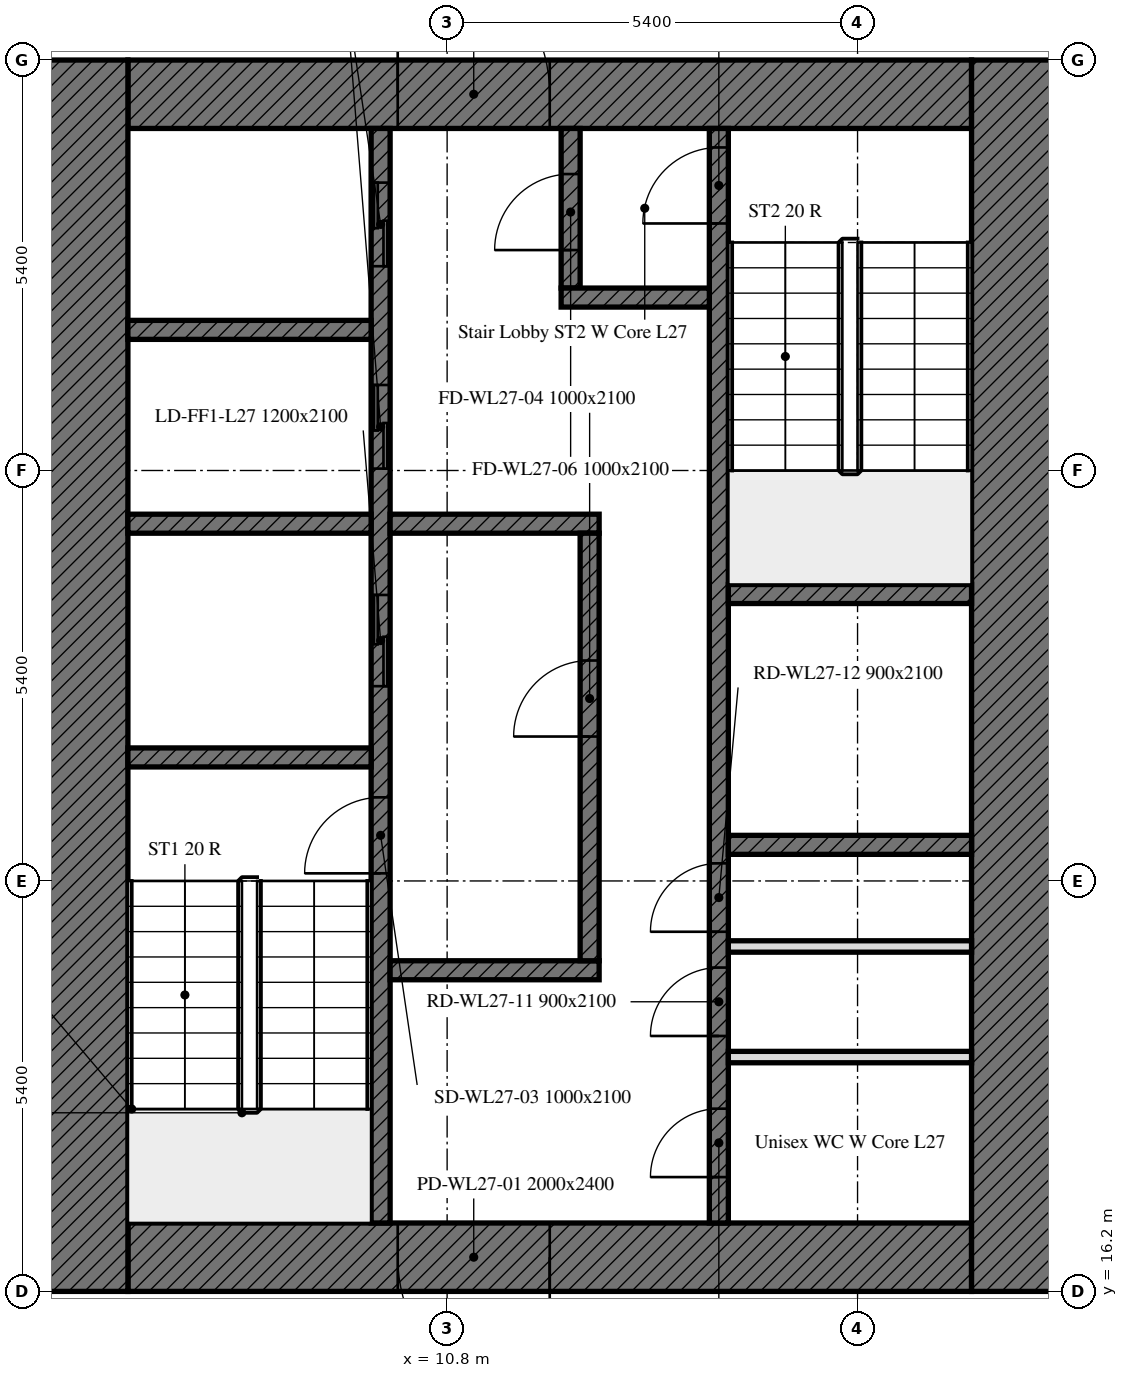
"""IFC4 building model, lengths in metres.
Left out: names, types, materials, properties, quantities, classifications, styles, units other than length and angle.
Written with IfcOpenShell. Run it as: python <this file> out.ifc"""

import sys

from ifc_helpers import new_model, si_unit, direction, frame, frame_2d, origin, place, context, subcontext, project, spatial, rectangle, extrude, element, fill, save


model = new_model("IFC4")
c1 = context("Model", 3, precision=1e-05, world=origin(), true_north=direction((0.0, 1.0)))
c2 = subcontext(c1, "Body", "Model", "MODEL_VIEW")
j1 = project(units=[si_unit("LENGTHUNIT", "METRE"), si_unit("PLANEANGLEUNIT", "RADIAN")], contexts=[c1])
p1 = place(None, origin())
s1 = spatial("IfcSite", under=j1, at=p1, CompositionType="ELEMENT")
p2 = place(p1, origin())
s2 = spatial("IfcBuilding", under=s1, at=p2, CompositionType="ELEMENT")
p3 = place(p2, frame((0.0, 0.0, 114.4)))
s3 = spatial("IfcBuildingStorey", under=s2, at=p3, CompositionType="ELEMENT", Elevation=114.4)
p4 = place(p3, frame((17.7, 16.65, 0.0), z_axis=(0.0, 0.0, 1.0), x_axis=(-1.0, 0.0, 0.0)))
e1 = element("IfcWall", 1, at=p4, inside=s3, PredefinedType="SOLIDWALL", context=c2, shape_type="SweptSolid", body=[
    extrude(rectangle(XDim=11.1, YDim=0.9, at=frame_2d((5.55, 0.0))), origin(), (0.0, 0.0, 1.0), 3.5),
])
p5 = place(p4, frame((5.55, 0.0, 0.0)))
e2 = element("IfcOpeningElement", 2, at=p5, cuts=e1, PredefinedType="OPENING", context=c2, shape_type="SweptSolid", body=[
    extrude(rectangle(XDim=2.0, YDim=2.4, at=frame_2d((1.0, 1.2))), frame((0.0, 0.45, 0.0), z_axis=(0.0, -1.0, 0.0), x_axis=(1.0, 0.0, 0.0)), (0.0, 0.0, 1.0), 0.9),
])
p6 = place(p3, frame((6.6, 31.95, 0.0), z_axis=(0.0, 0.0, 1.0), x_axis=(1.0, 0.0, 0.0)))
e3 = element("IfcWall", 3, at=p6, inside=s3, PredefinedType="SOLIDWALL", context=c2, shape_type="SweptSolid", body=[
    extrude(rectangle(XDim=11.1, YDim=0.9, at=frame_2d((5.55, 0.0))), origin(), (0.0, 0.0, 1.0), 3.5),
])
p7 = place(p6, frame((3.55, 0.0, 0.0)))
e4 = element("IfcOpeningElement", 4, at=p7, cuts=e3, PredefinedType="OPENING", context=c2, shape_type="SweptSolid", body=[
    extrude(rectangle(XDim=2.0, YDim=2.4, at=frame_2d((1.0, 1.2))), frame((0.0, 0.45, 0.0), z_axis=(0.0, -1.0, 0.0), x_axis=(1.0, 0.0, 0.0)), (0.0, 0.0, 1.0), 0.9),
])
for number, where, z_axis, x_axis in (
    (5, (6.0, 16.2, 0.0), (0.0, 0.0, 1.0), (0.0, 1.0, 0.0)),
    (6, (18.3, 32.4, 0.0), (0.0, 0.0, 1.0), (0.0, -1.0, 0.0)),
):
    element("IfcWall", number, at=place(p3, frame(where, z_axis=z_axis, x_axis=x_axis)), inside=s3, PredefinedType="SOLIDWALL", context=c2, shape_type="SweptSolid", body=[
        extrude(rectangle(XDim=16.2, YDim=1.2, at=frame_2d((8.1, 0.0))), origin(), (0.0, 0.0, 1.0), 3.5),
    ])
p8 = place(p3, frame((9.925, 17.1, 0.0), z_axis=(0.0, 0.0, 1.0), x_axis=(0.0, 1.0, 0.0)))
e7 = element("IfcWall", 7, at=p8, inside=s3, PredefinedType="SOLIDWALL", context=c2, shape_type="SweptSolid", body=[
    extrude(rectangle(XDim=14.4, YDim=0.25, at=frame_2d((7.2, 0.0))), origin(), (0.0, 0.0, 1.0), 3.5),
])
p9 = place(p8, frame((4.6, 0.0, 0.0)))
e8 = element("IfcOpeningElement", 8, at=p9, cuts=e7, PredefinedType="OPENING", context=c2, shape_type="SweptSolid", body=[
    extrude(rectangle(XDim=1.0, YDim=2.1, at=frame_2d((0.5, 1.05))), frame((0.0, 0.125, 0.0), z_axis=(0.0, -1.0, 0.0), x_axis=(1.0, 0.0, 0.0)), (0.0, 0.0, 1.0), 0.25),
])
p10 = place(p8, frame((7.062, 0.0, 0.0)))
e9 = element("IfcOpeningElement", 9, at=p10, cuts=e7, PredefinedType="OPENING", context=c2, shape_type="SweptSolid", body=[
    extrude(rectangle(XDim=1.2, YDim=2.1, at=frame_2d((0.6, 1.05))), frame((0.0, 0.125, 0.0), z_axis=(0.0, -1.0, 0.0), x_axis=(1.0, 0.0, 0.0)), (0.0, 0.0, 1.0), 0.25),
])
p11 = place(p8, frame((9.925, 0.0, 0.0)))
e10 = element("IfcOpeningElement", 10, at=p11, cuts=e7, PredefinedType="OPENING", context=c2, shape_type="SweptSolid", body=[
    extrude(rectangle(XDim=1.1, YDim=2.1, at=frame_2d((0.55, 1.05))), frame((0.0, 0.125, 0.0), z_axis=(0.0, -1.0, 0.0), x_axis=(1.0, 0.0, 0.0)), (0.0, 0.0, 1.0), 0.25),
])
p12 = place(p8, frame((12.587, 0.0, 0.0)))
e11 = element("IfcOpeningElement", 11, at=p12, cuts=e7, PredefinedType="OPENING", context=c2, shape_type="SweptSolid", body=[
    extrude(rectangle(XDim=1.1, YDim=2.1, at=frame_2d((0.55, 1.05))), frame((0.0, 0.125, 0.0), z_axis=(0.0, -1.0, 0.0), x_axis=(1.0, 0.0, 0.0)), (0.0, 0.0, 1.0), 0.25),
])
p13 = place(p3, frame((14.375, 17.1, 0.0), z_axis=(0.0, 0.0, 1.0), x_axis=(0.0, 1.0, 0.0)))
e12 = element("IfcWall", 12, at=p13, inside=s3, PredefinedType="SOLIDWALL", context=c2, shape_type="SweptSolid", body=[
    extrude(rectangle(XDim=14.4, YDim=0.25, at=frame_2d((7.2, 0.0))), origin(), (0.0, 0.0, 1.0), 3.5),
])
p14 = place(p13, frame((13.15, 0.0, 0.0)))
e13 = element("IfcOpeningElement", 13, at=p14, cuts=e12, PredefinedType="OPENING", context=c2, shape_type="SweptSolid", body=[
    extrude(rectangle(XDim=1.0, YDim=2.1, at=frame_2d((0.5, 1.05))), frame((0.0, 0.125, 0.0), z_axis=(0.0, -1.0, 0.0), x_axis=(1.0, 0.0, 0.0)), (0.0, 0.0, 1.0), 0.25),
])
p15 = place(p13, frame((0.604, 0.0, 0.0)))
e14 = element("IfcOpeningElement", 14, at=p15, cuts=e12, PredefinedType="OPENING", context=c2, shape_type="SweptSolid", body=[
    extrude(rectangle(XDim=0.9, YDim=2.1, at=frame_2d((0.45, 1.05))), frame((0.0, 0.125, 0.0), z_axis=(0.0, -1.0, 0.0), x_axis=(1.0, 0.0, 0.0)), (0.0, 0.0, 1.0), 0.25),
])
p16 = place(p13, frame((2.46, 0.0, 0.0)))
e15 = element("IfcOpeningElement", 15, at=p16, cuts=e12, PredefinedType="OPENING", context=c2, shape_type="SweptSolid", body=[
    extrude(rectangle(XDim=0.9, YDim=2.1, at=frame_2d((0.45, 1.05))), frame((0.0, 0.125, 0.0), z_axis=(0.0, -1.0, 0.0), x_axis=(1.0, 0.0, 0.0)), (0.0, 0.0, 1.0), 0.25),
])
p17 = place(p13, frame((3.832, 0.0, 0.0)))
e16 = element("IfcOpeningElement", 16, at=p17, cuts=e12, PredefinedType="OPENING", context=c2, shape_type="SweptSolid", body=[
    extrude(rectangle(XDim=0.9, YDim=2.1, at=frame_2d((0.45, 1.05))), frame((0.0, 0.125, 0.0), z_axis=(0.0, -1.0, 0.0), x_axis=(1.0, 0.0, 0.0)), (0.0, 0.0, 1.0), 0.25),
])
for number, where, z_axis, x_axis in (
    (17, (6.6, 23.225, 0.0), (0.0, 0.0, 1.0), (1.0, 0.0, 0.0)),
    (18, (14.5, 25.375, 0.0), (0.0, 0.0, 1.0), (1.0, 0.0, 0.0)),
    (19, (14.5, 22.075, 0.0), (0.0, 0.0, 1.0), (1.0, 0.0, 0.0)),
    (20, (6.6, 26.3, 0.0), (0.0, 0.0, 1.0), (1.0, 0.0, 0.0)),
):
    element("IfcWall", number, at=place(p3, frame(where, z_axis=z_axis, x_axis=x_axis)), inside=s3, PredefinedType="SOLIDWALL", context=c2, shape_type="SweptSolid", body=[
        extrude(rectangle(XDim=3.2, YDim=0.25, at=frame_2d((1.6, 0.0))), origin(), (0.0, 0.0, 1.0), 3.5),
    ])
for number, where, z_axis, x_axis in (
    (21, (10.05, 26.3, 0.0), (0.0, 0.0, 1.0), (1.0, 0.0, 0.0)),
    (22, (10.05, 20.425, 0.0), (0.0, 0.0, 1.0), (1.0, 0.0, 0.0)),
):
    element("IfcWall", number, at=place(p3, frame(where, z_axis=z_axis, x_axis=x_axis)), inside=s3, PredefinedType="SOLIDWALL", context=c2, shape_type="SweptSolid", body=[
        extrude(rectangle(XDim=2.75, YDim=0.25, at=frame_2d((1.375, 0.0))), origin(), (0.0, 0.0, 1.0), 3.5),
    ])
p18 = place(p3, frame((12.425, 29.4, 0.0), z_axis=(0.0, 0.0, 1.0), x_axis=(0.0, 1.0, 0.0)))
e23 = element("IfcWall", 23, at=p18, inside=s3, PredefinedType="SOLIDWALL", context=c2, shape_type="SweptSolid", body=[
    extrude(rectangle(XDim=2.1, YDim=0.25, at=frame_2d((1.05, 0.0))), origin(), (0.0, 0.0, 1.0), 3.5),
])
p19 = place(p18, frame((0.5, 0.0, 0.0)))
e24 = element("IfcOpeningElement", 24, at=p19, cuts=e23, PredefinedType="OPENING", context=c2, shape_type="SweptSolid", body=[
    extrude(rectangle(XDim=1.0, YDim=2.1, at=frame_2d((0.5, 1.05))), frame((0.0, 0.125, 0.0), z_axis=(0.0, -1.0, 0.0), x_axis=(1.0, 0.0, 0.0)), (0.0, 0.0, 1.0), 0.25),
])
p20 = place(p3, frame((12.3, 29.275, 0.0), z_axis=(0.0, 0.0, 1.0), x_axis=(1.0, 0.0, 0.0)))
e25 = element("IfcWall", 25, at=p20, inside=s3, PredefinedType="SOLIDWALL", context=c2, shape_type="SweptSolid", body=[
    extrude(rectangle(XDim=1.95, YDim=0.25, at=frame_2d((0.975, 0.0))), origin(), (0.0, 0.0, 1.0), 3.5),
])
p21 = place(p3, frame((12.675, 20.55, 0.0), z_axis=(0.0, 0.0, 1.0), x_axis=(0.0, 1.0, 0.0)))
e26 = element("IfcWall", 26, at=p21, inside=s3, PredefinedType="SOLIDWALL", context=c2, shape_type="SweptSolid", body=[
    extrude(rectangle(XDim=5.625, YDim=0.25, at=frame_2d((2.812, 0.0))), origin(), (0.0, 0.0, 1.0), 3.5),
])
p22 = place(p21, frame((2.95, 0.0, 0.0)))
e27 = element("IfcOpeningElement", 27, at=p22, cuts=e26, PredefinedType="OPENING", context=c2, shape_type="SweptSolid", body=[
    extrude(rectangle(XDim=1.0, YDim=2.1, at=frame_2d((0.5, 1.05))), frame((0.0, 0.125, 0.0), z_axis=(0.0, -1.0, 0.0), x_axis=(1.0, 0.0, 0.0)), (0.0, 0.0, 1.0), 0.25),
])
p23 = place(p3, frame((6.6, 28.85, 0.0), z_axis=(0.0, 0.0, 1.0), x_axis=(1.0, 0.0, 0.0)))
e28 = element("IfcWall", 28, at=p23, inside=s3, PredefinedType="SOLIDWALL", context=c2, shape_type="SweptSolid", body=[
    extrude(rectangle(XDim=3.2, YDim=0.25, at=frame_2d((1.6, 0.0))), origin(), (0.0, 0.0, 1.0), 3.5),
])
for number, where, z_axis, x_axis in (
    (29, (14.5, 19.283, 0.0), (0.0, 0.0, 1.0), (1.0, 0.0, 0.0)),
    (30, (14.5, 20.738, 0.0), (0.0, 0.0, 1.0), (1.0, 0.0, 0.0)),
):
    element("IfcWall", number, at=place(p3, frame(where, z_axis=z_axis, x_axis=x_axis)), inside=s3, PredefinedType="PARTITIONING", context=c2, shape_type="SweptSolid", body=[
        extrude(rectangle(XDim=3.2, YDim=0.15, at=frame_2d((1.6, 0.0))), origin(), (0.0, 0.0, 1.0), 3.5),
    ])
p24 = place(p5, origin())
e31 = element("IfcDoor", 31, at=p24, inside=s3, OperationType="DOUBLE_DOOR_SINGLE_SWING", PredefinedType="DOOR", context=c2, shape_type="SweptSolid", body=[
    extrude(rectangle(XDim=2.0, YDim=2.4, at=frame_2d((1.0, 1.2))), frame((0.0, 0.025, 0.0), z_axis=(0.0, -1.0, 0.0), x_axis=(1.0, 0.0, 0.0)), (0.0, 0.0, 1.0), 0.05),
])
fill(e2, e31)
p25 = place(p7, origin())
e32 = element("IfcDoor", 32, at=p25, inside=s3, OperationType="DOUBLE_DOOR_SINGLE_SWING", PredefinedType="DOOR", context=c2, shape_type="SweptSolid", body=[
    extrude(rectangle(XDim=2.0, YDim=2.4, at=frame_2d((1.0, 1.2))), frame((0.0, 0.025, 0.0), z_axis=(0.0, -1.0, 0.0), x_axis=(1.0, 0.0, 0.0)), (0.0, 0.0, 1.0), 0.05),
])
fill(e4, e32)
p26 = place(p9, origin())
e33 = element("IfcDoor", 33, at=p26, inside=s3, OperationType="SINGLE_SWING_LEFT", PredefinedType="DOOR", context=c2, shape_type="SweptSolid", body=[
    extrude(rectangle(XDim=1.0, YDim=2.1, at=frame_2d((0.5, 1.05))), frame((0.0, 0.025, 0.0), z_axis=(0.0, -1.0, 0.0), x_axis=(1.0, 0.0, 0.0)), (0.0, 0.0, 1.0), 0.05),
])
fill(e8, e33)
p27 = place(p22, origin())
e34 = element("IfcDoor", 34, at=p27, inside=s3, OperationType="SINGLE_SWING_LEFT", PredefinedType="DOOR", context=c2, shape_type="SweptSolid", body=[
    extrude(rectangle(XDim=1.0, YDim=2.1, at=frame_2d((0.5, 1.05))), frame((0.0, 0.025, 0.0), z_axis=(0.0, -1.0, 0.0), x_axis=(1.0, 0.0, 0.0)), (0.0, 0.0, 1.0), 0.05),
])
fill(e27, e34)
p28 = place(p14, origin())
e35 = element("IfcDoor", 35, at=p28, inside=s3, OperationType="SINGLE_SWING_LEFT", PredefinedType="DOOR", context=c2, shape_type="SweptSolid", body=[
    extrude(rectangle(XDim=1.0, YDim=2.1, at=frame_2d((0.5, 1.05))), frame((0.0, 0.025, 0.0), z_axis=(0.0, -1.0, 0.0), x_axis=(1.0, 0.0, 0.0)), (0.0, 0.0, 1.0), 0.05),
])
fill(e13, e35)
p29 = place(p19, origin())
e36 = element("IfcDoor", 36, at=p29, inside=s3, OperationType="SINGLE_SWING_LEFT", PredefinedType="DOOR", context=c2, shape_type="SweptSolid", body=[
    extrude(rectangle(XDim=1.0, YDim=2.1, at=frame_2d((0.5, 1.05))), frame((0.0, 0.025, 0.0), z_axis=(0.0, -1.0, 0.0), x_axis=(1.0, 0.0, 0.0)), (0.0, 0.0, 1.0), 0.05),
])
fill(e24, e36)
p30 = place(p10, origin())
e37 = element("IfcDoor", 37, at=p30, inside=s3, OperationType="DOUBLE_DOOR_SLIDING", PredefinedType="DOOR", context=c2, shape_type="SweptSolid", body=[
    extrude(rectangle(XDim=1.2, YDim=2.1, at=frame_2d((0.6, 1.05))), frame((0.0, 0.025, 0.0), z_axis=(0.0, -1.0, 0.0), x_axis=(1.0, 0.0, 0.0)), (0.0, 0.0, 1.0), 0.05),
])
fill(e9, e37)
p31 = place(p11, origin())
e38 = element("IfcDoor", 38, at=p31, inside=s3, OperationType="DOUBLE_DOOR_SLIDING", PredefinedType="DOOR", context=c2, shape_type="SweptSolid", body=[
    extrude(rectangle(XDim=1.1, YDim=2.1, at=frame_2d((0.55, 1.05))), frame((0.0, 0.025, 0.0), z_axis=(0.0, -1.0, 0.0), x_axis=(1.0, 0.0, 0.0)), (0.0, 0.0, 1.0), 0.05),
])
fill(e10, e38)
p32 = place(p12, origin())
e39 = element("IfcDoor", 39, at=p32, inside=s3, OperationType="DOUBLE_DOOR_SLIDING", PredefinedType="DOOR", context=c2, shape_type="SweptSolid", body=[
    extrude(rectangle(XDim=1.1, YDim=2.1, at=frame_2d((0.55, 1.05))), frame((0.0, 0.025, 0.0), z_axis=(0.0, -1.0, 0.0), x_axis=(1.0, 0.0, 0.0)), (0.0, 0.0, 1.0), 0.05),
])
fill(e11, e39)
p33 = place(p15, origin())
e40 = element("IfcDoor", 40, at=p33, inside=s3, OperationType="SINGLE_SWING_LEFT", PredefinedType="DOOR", context=c2, shape_type="SweptSolid", body=[
    extrude(rectangle(XDim=0.9, YDim=2.1, at=frame_2d((0.45, 1.05))), frame((0.0, 0.025, 0.0), z_axis=(0.0, -1.0, 0.0), x_axis=(1.0, 0.0, 0.0)), (0.0, 0.0, 1.0), 0.05),
])
fill(e14, e40)
p34 = place(p16, origin())
e41 = element("IfcDoor", 41, at=p34, inside=s3, OperationType="SINGLE_SWING_LEFT", PredefinedType="DOOR", context=c2, shape_type="SweptSolid", body=[
    extrude(rectangle(XDim=0.9, YDim=2.1, at=frame_2d((0.45, 1.05))), frame((0.0, 0.025, 0.0), z_axis=(0.0, -1.0, 0.0), x_axis=(1.0, 0.0, 0.0)), (0.0, 0.0, 1.0), 0.05),
])
fill(e15, e41)
p35 = place(p17, origin())
e42 = element("IfcDoor", 42, at=p35, inside=s3, OperationType="SINGLE_SWING_LEFT", PredefinedType="DOOR", context=c2, shape_type="SweptSolid", body=[
    extrude(rectangle(XDim=0.9, YDim=2.1, at=frame_2d((0.45, 1.05))), frame((0.0, 0.025, 0.0), z_axis=(0.0, -1.0, 0.0), x_axis=(1.0, 0.0, 0.0)), (0.0, 0.0, 1.0), 0.05),
])
fill(e16, e42)
save(model, sys.argv[1])
